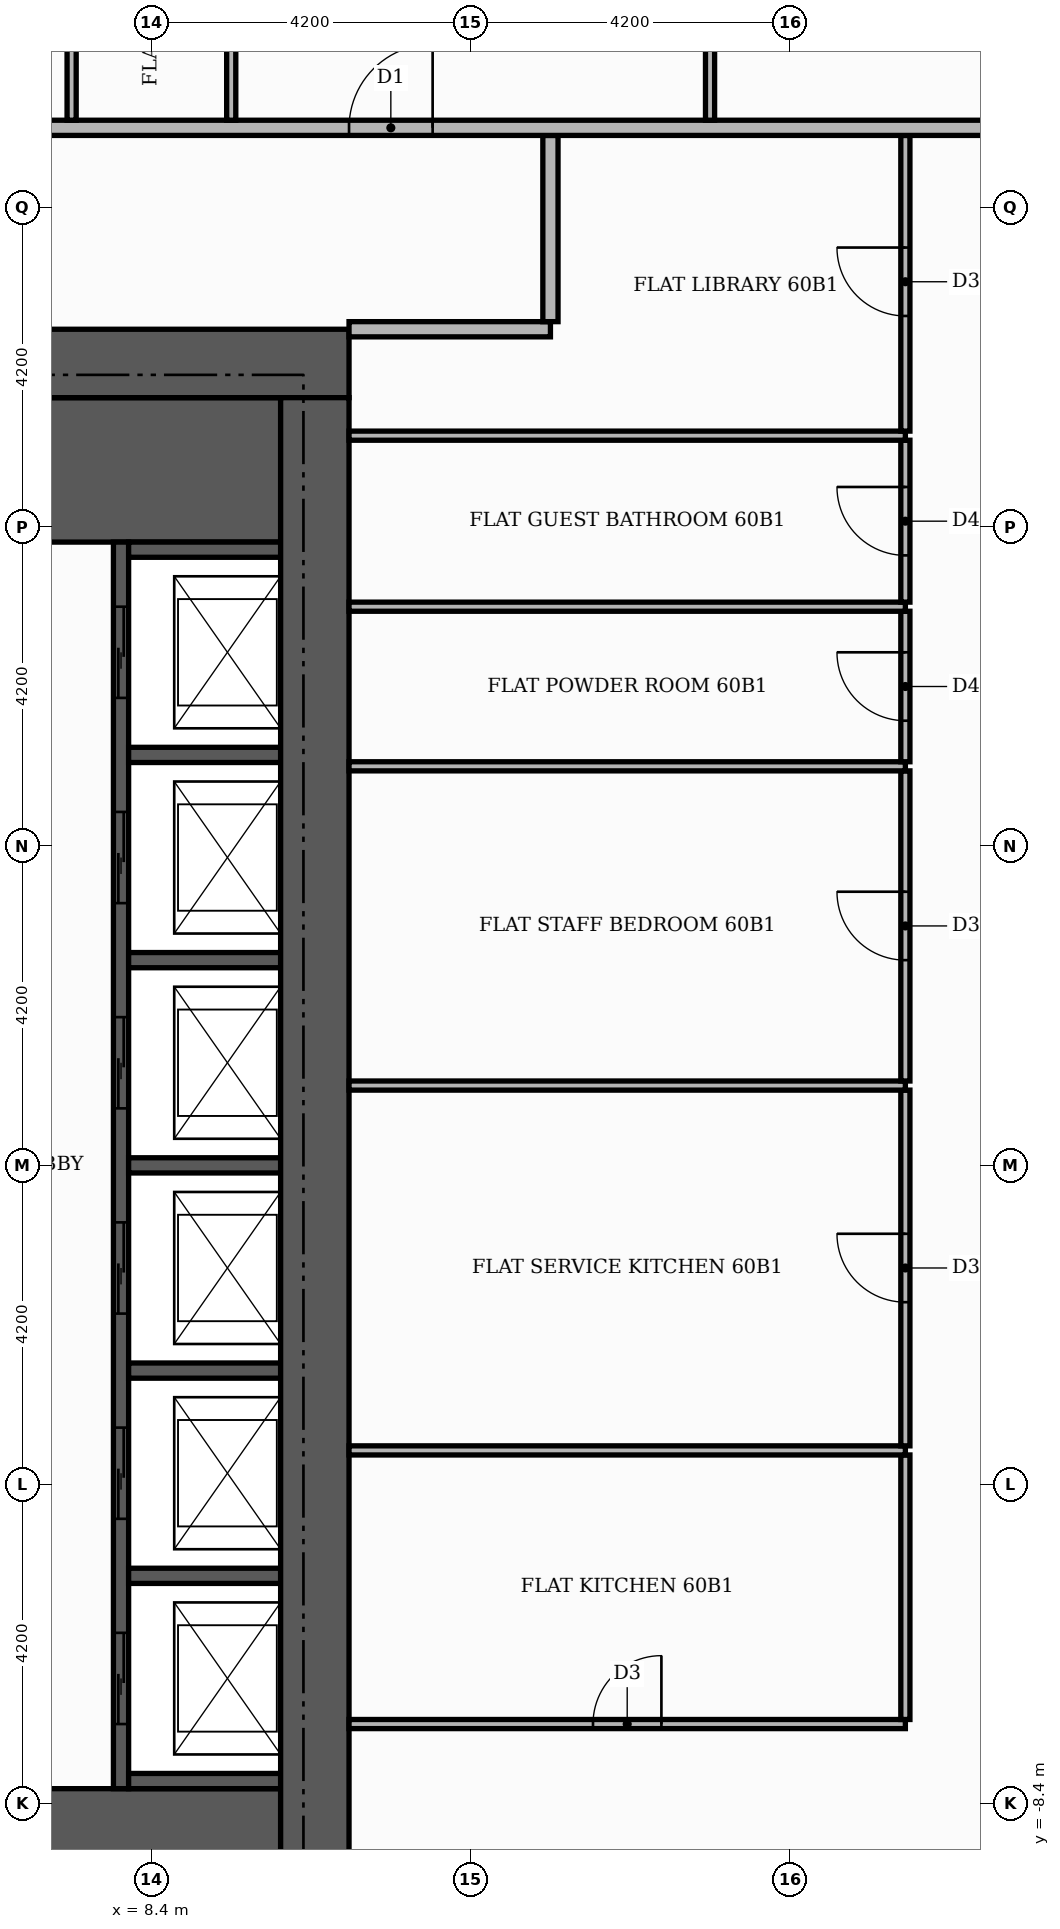
"""IFC4 building model, lengths in metres.
Left out: names, types, materials, properties, quantities, classifications, styles, units other than length and angle.
Written with IfcOpenShell. Run it as: python <this file> out.ifc"""

import sys

from ifc_helpers import new_model, si_unit, direction, frame, frame_2d, origin, place, context, subcontext, project, spatial, rectangle, extrude, element, fill, save


model = new_model("IFC4")
c1 = context("Model", 3, precision=1e-05, world=origin(), true_north=direction((0.0, 1.0)))
c2 = subcontext(c1, "Body", "Model", "MODEL_VIEW")
j1 = project(units=[si_unit("LENGTHUNIT", "METRE"), si_unit("PLANEANGLEUNIT", "RADIAN")], contexts=[c1])
p1 = place(None, origin())
s1 = spatial("IfcSite", under=j1, at=p1, CompositionType="ELEMENT")
p2 = place(p1, origin())
s2 = spatial("IfcBuilding", under=s1, at=p2, CompositionType="ELEMENT")
p3 = place(p2, frame((0.0, 0.0, 252.3)))
s3 = spatial("IfcBuildingStorey", under=s2, at=p3, CompositionType="ELEMENT", Elevation=252.3)
for number, where, z_axis, x_axis in (
    (1, (5.5, -9.15, 0.0), (0.0, 0.0, 1.0), (1.0, 0.0, 0.0)),
    (2, (5.5, 9.15, 0.0), (0.0, 0.0, 1.0), (1.0, 0.0, 0.0)),
):
    element("IfcWall", number, at=place(p3, frame(where, z_axis=z_axis, x_axis=x_axis)), inside=s3, PredefinedType="SHEAR", context=c2, shape_type="SweptSolid", body=[
        extrude(rectangle(XDim=4.6, YDim=1.9, at=frame_2d((2.3, 0.0))), origin(), (0.0, 0.0, 1.0), 3.48),
    ])
p4 = place(p3, frame((8.0, -8.2, 0.0), z_axis=(0.0, 0.0, 1.0), x_axis=(0.0, 1.0, 0.0)))
e3 = element("IfcWall", 3, at=p4, inside=s3, PredefinedType="SHEAR", context=c2, shape_type="SweptSolid", body=[
    extrude(rectangle(XDim=16.4, YDim=0.2, at=frame_2d((8.2, 0.0))), origin(), (0.0, 0.0, 1.0), 3.48),
])
p5 = place(p4, frame((0.85, 0.0, 0.0)))
e4 = element("IfcOpeningElement", 4, at=p5, cuts=e3, PredefinedType="OPENING", context=c2, shape_type="SweptSolid", body=[
    extrude(rectangle(XDim=1.2, YDim=2.1, at=frame_2d((0.6, 1.05))), frame((0.0, 0.11, 0.0), z_axis=(0.0, -1.0, 0.0), x_axis=(1.0, 0.0, 0.0)), (0.0, 0.0, 1.0), 0.22),
])
p6 = place(p4, frame((3.55, 0.0, 0.0)))
e5 = element("IfcOpeningElement", 5, at=p6, cuts=e3, PredefinedType="OPENING", context=c2, shape_type="SweptSolid", body=[
    extrude(rectangle(XDim=1.2, YDim=2.1, at=frame_2d((0.6, 1.05))), frame((0.0, 0.11, 0.0), z_axis=(0.0, -1.0, 0.0), x_axis=(1.0, 0.0, 0.0)), (0.0, 0.0, 1.0), 0.22),
])
p7 = place(p4, frame((6.25, 0.0, 0.0)))
e6 = element("IfcOpeningElement", 6, at=p7, cuts=e3, PredefinedType="OPENING", context=c2, shape_type="SweptSolid", body=[
    extrude(rectangle(XDim=1.2, YDim=2.1, at=frame_2d((0.6, 1.05))), frame((0.0, 0.11, 0.0), z_axis=(0.0, -1.0, 0.0), x_axis=(1.0, 0.0, 0.0)), (0.0, 0.0, 1.0), 0.22),
])
p8 = place(p4, frame((8.95, 0.0, 0.0)))
e7 = element("IfcOpeningElement", 7, at=p8, cuts=e3, PredefinedType="OPENING", context=c2, shape_type="SweptSolid", body=[
    extrude(rectangle(XDim=1.2, YDim=2.1, at=frame_2d((0.6, 1.05))), frame((0.0, 0.11, 0.0), z_axis=(0.0, -1.0, 0.0), x_axis=(1.0, 0.0, 0.0)), (0.0, 0.0, 1.0), 0.22),
])
p9 = place(p4, frame((11.65, 0.0, 0.0)))
e8 = element("IfcOpeningElement", 8, at=p9, cuts=e3, PredefinedType="OPENING", context=c2, shape_type="SweptSolid", body=[
    extrude(rectangle(XDim=1.2, YDim=2.1, at=frame_2d((0.6, 1.05))), frame((0.0, 0.11, 0.0), z_axis=(0.0, -1.0, 0.0), x_axis=(1.0, 0.0, 0.0)), (0.0, 0.0, 1.0), 0.22),
])
p10 = place(p4, frame((14.35, 0.0, 0.0)))
e9 = element("IfcOpeningElement", 9, at=p10, cuts=e3, PredefinedType="OPENING", context=c2, shape_type="SweptSolid", body=[
    extrude(rectangle(XDim=1.2, YDim=2.1, at=frame_2d((0.6, 1.05))), frame((0.0, 0.11, 0.0), z_axis=(0.0, -1.0, 0.0), x_axis=(1.0, 0.0, 0.0)), (0.0, 0.0, 1.0), 0.22),
])
for number, where, z_axis, x_axis in (
    (10, (8.1, -8.1, 0.0), (0.0, 0.0, 1.0), (1.0, 0.0, 0.0)),
    (11, (8.1, -5.4, 0.0), (0.0, 0.0, 1.0), (1.0, 0.0, 0.0)),
    (12, (8.1, -2.7, 0.0), (0.0, 0.0, 1.0), (1.0, 0.0, 0.0)),
    (13, (8.1, 0.0, 0.0), (0.0, 0.0, 1.0), (1.0, 0.0, 0.0)),
    (14, (8.1, 2.7, 0.0), (0.0, 0.0, 1.0), (1.0, 0.0, 0.0)),
    (15, (8.1, 5.4, 0.0), (0.0, 0.0, 1.0), (1.0, 0.0, 0.0)),
    (16, (8.1, 8.1, 0.0), (0.0, 0.0, 1.0), (1.0, 0.0, 0.0)),
):
    element("IfcWall", number, at=place(p3, frame(where, z_axis=z_axis, x_axis=x_axis)), inside=s3, PredefinedType="SHEAR", context=c2, shape_type="SweptSolid", body=[
        extrude(rectangle(XDim=2.0, YDim=0.2, at=frame_2d((1.0, 0.0))), origin(), (0.0, 0.0, 1.0), 3.48),
    ])
p11 = place(p3, frame((-11.0, 10.55, 0.0), z_axis=(0.0, 0.0, 1.0), x_axis=(1.0, 0.0, 0.0)))
e17 = element("IfcWall", 17, at=p11, inside=s3, PredefinedType="SHEAR", context=c2, shape_type="SweptSolid", body=[
    extrude(rectangle(XDim=22.0, YDim=0.9, at=frame_2d((11.0, 0.0))), origin(), (0.0, 0.0, 1.0), 3.48),
])
p12 = place(p11, frame((13.3, 0.0, 0.0)))
e18 = element("IfcOpeningElement", 18, at=p12, cuts=e17, PredefinedType="OPENING", context=c2, shape_type="SweptSolid", body=[
    extrude(rectangle(XDim=1.8, YDim=2.2, at=frame_2d((0.9, 1.1))), frame((0.0, 0.46, 0.0), z_axis=(0.0, -1.0, 0.0), x_axis=(1.0, 0.0, 0.0)), (0.0, 0.0, 1.0), 0.92),
])
p13 = place(p3, frame((10.55, -10.1, 0.0), z_axis=(0.0, 0.0, 1.0), x_axis=(0.0, 1.0, 0.0)))
e19 = element("IfcWall", 19, at=p13, inside=s3, PredefinedType="SHEAR", context=c2, shape_type="SweptSolid", body=[
    extrude(rectangle(XDim=20.2, YDim=0.9, at=frame_2d((10.1, 0.0))), origin(), (0.0, 0.0, 1.0), 3.48),
])
p14 = place(p3, frame((11.0, -7.35, 0.0), z_axis=(0.0, 0.0, 1.0), x_axis=(1.0, 0.0, 0.0)))
e20 = element("IfcWall", 20, at=p14, inside=s3, PredefinedType="PARTITIONING", context=c2, shape_type="SweptSolid", body=[
    extrude(rectangle(XDim=7.32, YDim=0.12, at=frame_2d((3.66, 0.0))), origin(), (0.0, 0.0, 1.0), 3.48),
])
p15 = place(p14, frame((3.21, 0.0, 0.0)))
e21 = element("IfcOpeningElement", 21, at=p15, cuts=e20, PredefinedType="OPENING", context=c2, shape_type="SweptSolid", body=[
    extrude(rectangle(XDim=0.9, YDim=2.1, at=frame_2d((0.45, 1.05))), frame((0.0, 0.07, 0.0), z_axis=(0.0, -1.0, 0.0), x_axis=(1.0, 0.0, 0.0)), (0.0, 0.0, 1.0), 0.14),
])
p16 = place(p3, frame((18.32, -7.29, 0.0), z_axis=(0.0, 0.0, 1.0), x_axis=(0.0, 1.0, 0.0)))
e22 = element("IfcWall", 22, at=p16, inside=s3, PredefinedType="PARTITIONING", context=c2, shape_type="SweptSolid", body=[
    extrude(rectangle(XDim=3.48, YDim=0.12, at=frame_2d((1.74, 0.0))), origin(), (0.0, 0.0, 1.0), 3.48),
])
p17 = place(p3, frame((11.0, -3.75, 0.0), z_axis=(0.0, 0.0, 1.0), x_axis=(1.0, 0.0, 0.0)))
e23 = element("IfcWall", 23, at=p17, inside=s3, PredefinedType="PARTITIONING", context=c2, shape_type="SweptSolid", body=[
    extrude(rectangle(XDim=7.32, YDim=0.12, at=frame_2d((3.66, 0.0))), origin(), (0.0, 0.0, 1.0), 3.48),
])
p18 = place(p3, frame((18.32, -3.69, 0.0), z_axis=(0.0, 0.0, 1.0), x_axis=(0.0, 1.0, 0.0)))
e24 = element("IfcWall", 24, at=p18, inside=s3, PredefinedType="PARTITIONING", context=c2, shape_type="SweptSolid", body=[
    extrude(rectangle(XDim=4.68, YDim=0.12, at=frame_2d((2.34, 0.0))), origin(), (0.0, 0.0, 1.0), 3.48),
])
p19 = place(p18, frame((1.89, 0.0, 0.0)))
e25 = element("IfcOpeningElement", 25, at=p19, cuts=e24, PredefinedType="OPENING", context=c2, shape_type="SweptSolid", body=[
    extrude(rectangle(XDim=0.9, YDim=2.1, at=frame_2d((0.45, 1.05))), frame((0.0, 0.07, 0.0), z_axis=(0.0, -1.0, 0.0), x_axis=(1.0, 0.0, 0.0)), (0.0, 0.0, 1.0), 0.14),
])
p20 = place(p3, frame((11.0, 1.05, 0.0), z_axis=(0.0, 0.0, 1.0), x_axis=(1.0, 0.0, 0.0)))
e26 = element("IfcWall", 26, at=p20, inside=s3, PredefinedType="PARTITIONING", context=c2, shape_type="SweptSolid", body=[
    extrude(rectangle(XDim=7.32, YDim=0.12, at=frame_2d((3.66, 0.0))), origin(), (0.0, 0.0, 1.0), 3.48),
])
p21 = place(p3, frame((18.32, 1.11, 0.0), z_axis=(0.0, 0.0, 1.0), x_axis=(0.0, 1.0, 0.0)))
e27 = element("IfcWall", 27, at=p21, inside=s3, PredefinedType="PARTITIONING", context=c2, shape_type="SweptSolid", body=[
    extrude(rectangle(XDim=4.08, YDim=0.12, at=frame_2d((2.04, 0.0))), origin(), (0.0, 0.0, 1.0), 3.48),
])
p22 = place(p21, frame((1.59, 0.0, 0.0)))
e28 = element("IfcOpeningElement", 28, at=p22, cuts=e27, PredefinedType="OPENING", context=c2, shape_type="SweptSolid", body=[
    extrude(rectangle(XDim=0.9, YDim=2.1, at=frame_2d((0.45, 1.05))), frame((0.0, 0.07, 0.0), z_axis=(0.0, -1.0, 0.0), x_axis=(1.0, 0.0, 0.0)), (0.0, 0.0, 1.0), 0.14),
])
p23 = place(p3, frame((11.0, 5.25, 0.0), z_axis=(0.0, 0.0, 1.0), x_axis=(1.0, 0.0, 0.0)))
e29 = element("IfcWall", 29, at=p23, inside=s3, PredefinedType="PARTITIONING", context=c2, shape_type="SweptSolid", body=[
    extrude(rectangle(XDim=7.32, YDim=0.12, at=frame_2d((3.66, 0.0))), origin(), (0.0, 0.0, 1.0), 3.48),
])
p24 = place(p3, frame((18.32, 5.31, 0.0), z_axis=(0.0, 0.0, 1.0), x_axis=(0.0, 1.0, 0.0)))
e30 = element("IfcWall", 30, at=p24, inside=s3, PredefinedType="PARTITIONING", context=c2, shape_type="SweptSolid", body=[
    extrude(rectangle(XDim=1.98, YDim=0.12, at=frame_2d((0.99, 0.0))), origin(), (0.0, 0.0, 1.0), 3.48),
])
p25 = place(p24, frame((0.54, 0.0, 0.0)))
e31 = element("IfcOpeningElement", 31, at=p25, cuts=e30, PredefinedType="OPENING", context=c2, shape_type="SweptSolid", body=[
    extrude(rectangle(XDim=0.9, YDim=2.1, at=frame_2d((0.45, 1.05))), frame((0.0, 0.07, 0.0), z_axis=(0.0, -1.0, 0.0), x_axis=(1.0, 0.0, 0.0)), (0.0, 0.0, 1.0), 0.14),
])
p26 = place(p3, frame((11.0, 7.35, 0.0), z_axis=(0.0, 0.0, 1.0), x_axis=(1.0, 0.0, 0.0)))
e32 = element("IfcWall", 32, at=p26, inside=s3, PredefinedType="PARTITIONING", context=c2, shape_type="SweptSolid", body=[
    extrude(rectangle(XDim=7.32, YDim=0.12, at=frame_2d((3.66, 0.0))), origin(), (0.0, 0.0, 1.0), 3.48),
])
p27 = place(p3, frame((18.32, 7.41, 0.0), z_axis=(0.0, 0.0, 1.0), x_axis=(0.0, 1.0, 0.0)))
e33 = element("IfcWall", 33, at=p27, inside=s3, PredefinedType="PARTITIONING", context=c2, shape_type="SweptSolid", body=[
    extrude(rectangle(XDim=2.13, YDim=0.12, at=frame_2d((1.065, 0.0))), origin(), (0.0, 0.0, 1.0), 3.48),
])
p28 = place(p27, frame((0.615, 0.0, 0.0)))
e34 = element("IfcOpeningElement", 34, at=p28, cuts=e33, PredefinedType="OPENING", context=c2, shape_type="SweptSolid", body=[
    extrude(rectangle(XDim=0.9, YDim=2.1, at=frame_2d((0.45, 1.05))), frame((0.0, 0.07, 0.0), z_axis=(0.0, -1.0, 0.0), x_axis=(1.0, 0.0, 0.0)), (0.0, 0.0, 1.0), 0.14),
])
p29 = place(p3, frame((11.0, 9.6, 0.0), z_axis=(0.0, 0.0, 1.0), x_axis=(1.0, 0.0, 0.0)))
e35 = element("IfcWall", 35, at=p29, inside=s3, PredefinedType="PARTITIONING", context=c2, shape_type="SweptSolid", body=[
    extrude(rectangle(XDim=7.32, YDim=0.12, at=frame_2d((3.66, 0.0))), origin(), (0.0, 0.0, 1.0), 3.48),
])
p30 = place(p3, frame((18.32, 9.66, 0.0), z_axis=(0.0, 0.0, 1.0), x_axis=(0.0, 1.0, 0.0)))
e36 = element("IfcWall", 36, at=p30, inside=s3, PredefinedType="PARTITIONING", context=c2, shape_type="SweptSolid", body=[
    extrude(rectangle(XDim=3.89, YDim=0.12, at=frame_2d((1.945, 0.0))), origin(), (0.0, 0.0, 1.0), 3.48),
])
p31 = place(p30, frame((1.515, 0.0, 0.0)))
e37 = element("IfcOpeningElement", 37, at=p31, cuts=e36, PredefinedType="OPENING", context=c2, shape_type="SweptSolid", body=[
    extrude(rectangle(XDim=0.9, YDim=2.1, at=frame_2d((0.45, 1.05))), frame((0.0, 0.07, 0.0), z_axis=(0.0, -1.0, 0.0), x_axis=(1.0, 0.0, 0.0)), (0.0, 0.0, 1.0), 0.14),
])
p32 = place(p3, frame((11.0, 11.0, 0.0), z_axis=(0.0, 0.0, 1.0), x_axis=(1.0, 0.0, 0.0)))
e38 = element("IfcWall", 38, at=p32, inside=s3, PredefinedType="PARTITIONING", context=c2, shape_type="SweptSolid", body=[
    extrude(rectangle(XDim=2.65, YDim=0.2, at=frame_2d((1.325, 0.0))), origin(), (0.0, 0.0, 1.0), 3.48),
])
p33 = place(p3, frame((13.65, 11.1, 0.0), z_axis=(0.0, 0.0, 1.0), x_axis=(0.0, 1.0, 0.0)))
e39 = element("IfcWall", 39, at=p33, inside=s3, PredefinedType="PARTITIONING", context=c2, shape_type="SweptSolid", body=[
    extrude(rectangle(XDim=2.45, YDim=0.2, at=frame_2d((1.225, 0.0))), origin(), (0.0, 0.0, 1.0), 3.48),
])
p34 = place(p3, frame((-13.65, 13.65, 0.0), z_axis=(0.0, 0.0, 1.0), x_axis=(1.0, 0.0, 0.0)))
e40 = element("IfcWall", 40, at=p34, inside=s3, PredefinedType="PARTITIONING", context=c2, shape_type="SweptSolid", body=[
    extrude(rectangle(XDim=39.07, YDim=0.2, at=frame_2d((19.535, 0.0))), origin(), (0.0, 0.0, 1.0), 3.48),
])
p35 = place(p34, frame((24.65, 0.0, 0.0)))
e41 = element("IfcOpeningElement", 41, at=p35, cuts=e40, PredefinedType="OPENING", context=c2, shape_type="SweptSolid", body=[
    extrude(rectangle(XDim=1.1, YDim=2.4, at=frame_2d((0.55, 1.2))), frame((0.0, 0.11, 0.0), z_axis=(0.0, -1.0, 0.0), x_axis=(1.0, 0.0, 0.0)), (0.0, 0.0, 1.0), 0.22),
])
p36 = place(p34, frame((14.15, 0.0, 0.0)))
e42 = element("IfcOpeningElement", 42, at=p36, cuts=e40, PredefinedType="OPENING", context=c2, shape_type="SweptSolid", body=[
    extrude(rectangle(XDim=1.1, YDim=2.4, at=frame_2d((0.55, 1.2))), frame((0.0, 0.11, 0.0), z_axis=(0.0, -1.0, 0.0), x_axis=(1.0, 0.0, 0.0)), (0.0, 0.0, 1.0), 0.22),
])
p37 = place(p3, frame((7.35, 13.75, 0.0), z_axis=(0.0, 0.0, 1.0), x_axis=(0.0, 1.0, 0.0)))
e43 = element("IfcWall", 43, at=p37, inside=s3, PredefinedType="PARTITIONING", context=c2, shape_type="SweptSolid", body=[
    extrude(rectangle(XDim=5.11, YDim=0.12, at=frame_2d((2.555, 0.0))), origin(), (0.0, 0.0, 1.0), 3.48),
])
p38 = place(p3, frame((9.45, 13.75, 0.0), z_axis=(0.0, 0.0, 1.0), x_axis=(0.0, 1.0, 0.0)))
e44 = element("IfcWall", 44, at=p38, inside=s3, PredefinedType="PARTITIONING", context=c2, shape_type="SweptSolid", body=[
    extrude(rectangle(XDim=5.11, YDim=0.12, at=frame_2d((2.555, 0.0))), origin(), (0.0, 0.0, 1.0), 3.48),
])
p39 = place(p38, frame((2.085, 0.0, 0.0)))
e45 = element("IfcOpeningElement", 45, at=p39, cuts=e44, PredefinedType="OPENING", context=c2, shape_type="SweptSolid", body=[
    extrude(rectangle(XDim=0.9, YDim=2.1, at=frame_2d((0.45, 1.05))), frame((0.0, 0.07, 0.0), z_axis=(0.0, -1.0, 0.0), x_axis=(1.0, 0.0, 0.0)), (0.0, 0.0, 1.0), 0.14),
])
p40 = place(p3, frame((15.75, 13.75, 0.0), z_axis=(0.0, 0.0, 1.0), x_axis=(0.0, 1.0, 0.0)))
e46 = element("IfcWall", 46, at=p40, inside=s3, PredefinedType="PARTITIONING", context=c2, shape_type="SweptSolid", body=[
    extrude(rectangle(XDim=6.61, YDim=0.12, at=frame_2d((3.305, 0.0))), origin(), (0.0, 0.0, 1.0), 3.48),
])
p41 = place(p40, frame((2.785, 0.0, 0.0)))
e47 = element("IfcOpeningElement", 47, at=p41, cuts=e46, PredefinedType="OPENING", context=c2, shape_type="SweptSolid", body=[
    extrude(rectangle(XDim=1.0, YDim=2.1, at=frame_2d((0.5, 1.05))), frame((0.0, 0.07, 0.0), z_axis=(0.0, -1.0, 0.0), x_axis=(1.0, 0.0, 0.0)), (0.0, 0.0, 1.0), 0.14),
])
p42 = place(p5, origin())
e48 = element("IfcDoor", 48, at=p42, inside=s3, OperationType="SLIDING_TO_LEFT", PredefinedType="DOOR", context=c2, shape_type="SweptSolid", body=[
    extrude(rectangle(XDim=1.2, YDim=2.1, at=frame_2d((0.6, 1.05))), frame((0.0, 0.025, 0.0), z_axis=(0.0, -1.0, 0.0), x_axis=(1.0, 0.0, 0.0)), (0.0, 0.0, 1.0), 0.05),
])
fill(e4, e48)
p43 = place(p6, origin())
e49 = element("IfcDoor", 49, at=p43, inside=s3, OperationType="SLIDING_TO_LEFT", PredefinedType="DOOR", context=c2, shape_type="SweptSolid", body=[
    extrude(rectangle(XDim=1.2, YDim=2.1, at=frame_2d((0.6, 1.05))), frame((0.0, 0.025, 0.0), z_axis=(0.0, -1.0, 0.0), x_axis=(1.0, 0.0, 0.0)), (0.0, 0.0, 1.0), 0.05),
])
fill(e5, e49)
p44 = place(p7, origin())
e50 = element("IfcDoor", 50, at=p44, inside=s3, OperationType="SLIDING_TO_LEFT", PredefinedType="DOOR", context=c2, shape_type="SweptSolid", body=[
    extrude(rectangle(XDim=1.2, YDim=2.1, at=frame_2d((0.6, 1.05))), frame((0.0, 0.025, 0.0), z_axis=(0.0, -1.0, 0.0), x_axis=(1.0, 0.0, 0.0)), (0.0, 0.0, 1.0), 0.05),
])
fill(e6, e50)
p45 = place(p8, origin())
e51 = element("IfcDoor", 51, at=p45, inside=s3, OperationType="SLIDING_TO_LEFT", PredefinedType="DOOR", context=c2, shape_type="SweptSolid", body=[
    extrude(rectangle(XDim=1.2, YDim=2.1, at=frame_2d((0.6, 1.05))), frame((0.0, 0.025, 0.0), z_axis=(0.0, -1.0, 0.0), x_axis=(1.0, 0.0, 0.0)), (0.0, 0.0, 1.0), 0.05),
])
fill(e7, e51)
p46 = place(p9, origin())
e52 = element("IfcDoor", 52, at=p46, inside=s3, OperationType="SLIDING_TO_LEFT", PredefinedType="DOOR", context=c2, shape_type="SweptSolid", body=[
    extrude(rectangle(XDim=1.2, YDim=2.1, at=frame_2d((0.6, 1.05))), frame((0.0, 0.025, 0.0), z_axis=(0.0, -1.0, 0.0), x_axis=(1.0, 0.0, 0.0)), (0.0, 0.0, 1.0), 0.05),
])
fill(e8, e52)
p47 = place(p10, origin())
e53 = element("IfcDoor", 53, at=p47, inside=s3, OperationType="SLIDING_TO_LEFT", PredefinedType="DOOR", context=c2, shape_type="SweptSolid", body=[
    extrude(rectangle(XDim=1.2, YDim=2.1, at=frame_2d((0.6, 1.05))), frame((0.0, 0.025, 0.0), z_axis=(0.0, -1.0, 0.0), x_axis=(1.0, 0.0, 0.0)), (0.0, 0.0, 1.0), 0.05),
])
fill(e9, e53)
p48 = place(p15, origin())
e54 = element("IfcDoor", 54, at=p48, inside=s3, OperationType="SINGLE_SWING_RIGHT", PredefinedType="DOOR", context=c2, shape_type="SweptSolid", body=[
    extrude(rectangle(XDim=0.9, YDim=2.1, at=frame_2d((0.45, 1.05))), frame((0.0, 0.025, 0.0), z_axis=(0.0, -1.0, 0.0), x_axis=(1.0, 0.0, 0.0)), (0.0, 0.0, 1.0), 0.05),
])
fill(e21, e54)
p49 = place(p19, origin())
e55 = element("IfcDoor", 55, at=p49, inside=s3, OperationType="SINGLE_SWING_RIGHT", PredefinedType="DOOR", context=c2, shape_type="SweptSolid", body=[
    extrude(rectangle(XDim=0.9, YDim=2.1, at=frame_2d((0.45, 1.05))), frame((0.0, 0.025, 0.0), z_axis=(0.0, -1.0, 0.0), x_axis=(1.0, 0.0, 0.0)), (0.0, 0.0, 1.0), 0.05),
])
fill(e25, e55)
p50 = place(p22, origin())
e56 = element("IfcDoor", 56, at=p50, inside=s3, OperationType="SINGLE_SWING_RIGHT", PredefinedType="DOOR", context=c2, shape_type="SweptSolid", body=[
    extrude(rectangle(XDim=0.9, YDim=2.1, at=frame_2d((0.45, 1.05))), frame((0.0, 0.025, 0.0), z_axis=(0.0, -1.0, 0.0), x_axis=(1.0, 0.0, 0.0)), (0.0, 0.0, 1.0), 0.05),
])
fill(e28, e56)
p51 = place(p25, origin())
e57 = element("IfcDoor", 57, at=p51, inside=s3, OperationType="SINGLE_SWING_RIGHT", PredefinedType="DOOR", context=c2, shape_type="SweptSolid", body=[
    extrude(rectangle(XDim=0.9, YDim=2.1, at=frame_2d((0.45, 1.05))), frame((0.0, 0.025, 0.0), z_axis=(0.0, -1.0, 0.0), x_axis=(1.0, 0.0, 0.0)), (0.0, 0.0, 1.0), 0.05),
])
fill(e31, e57)
p52 = place(p28, origin())
e58 = element("IfcDoor", 58, at=p52, inside=s3, OperationType="SINGLE_SWING_RIGHT", PredefinedType="DOOR", context=c2, shape_type="SweptSolid", body=[
    extrude(rectangle(XDim=0.9, YDim=2.1, at=frame_2d((0.45, 1.05))), frame((0.0, 0.025, 0.0), z_axis=(0.0, -1.0, 0.0), x_axis=(1.0, 0.0, 0.0)), (0.0, 0.0, 1.0), 0.05),
])
fill(e34, e58)
p53 = place(p31, origin())
e59 = element("IfcDoor", 59, at=p53, inside=s3, OperationType="SINGLE_SWING_RIGHT", PredefinedType="DOOR", context=c2, shape_type="SweptSolid", body=[
    extrude(rectangle(XDim=0.9, YDim=2.1, at=frame_2d((0.45, 1.05))), frame((0.0, 0.025, 0.0), z_axis=(0.0, -1.0, 0.0), x_axis=(1.0, 0.0, 0.0)), (0.0, 0.0, 1.0), 0.05),
])
fill(e37, e59)
p54 = place(p35, origin())
e60 = element("IfcDoor", 60, at=p54, inside=s3, OperationType="SINGLE_SWING_RIGHT", PredefinedType="DOOR", context=c2, shape_type="SweptSolid", body=[
    extrude(rectangle(XDim=1.1, YDim=2.4, at=frame_2d((0.55, 1.2))), frame((0.0, 0.025, 0.0), z_axis=(0.0, -1.0, 0.0), x_axis=(1.0, 0.0, 0.0)), (0.0, 0.0, 1.0), 0.05),
])
fill(e41, e60)
save(model, sys.argv[1])
